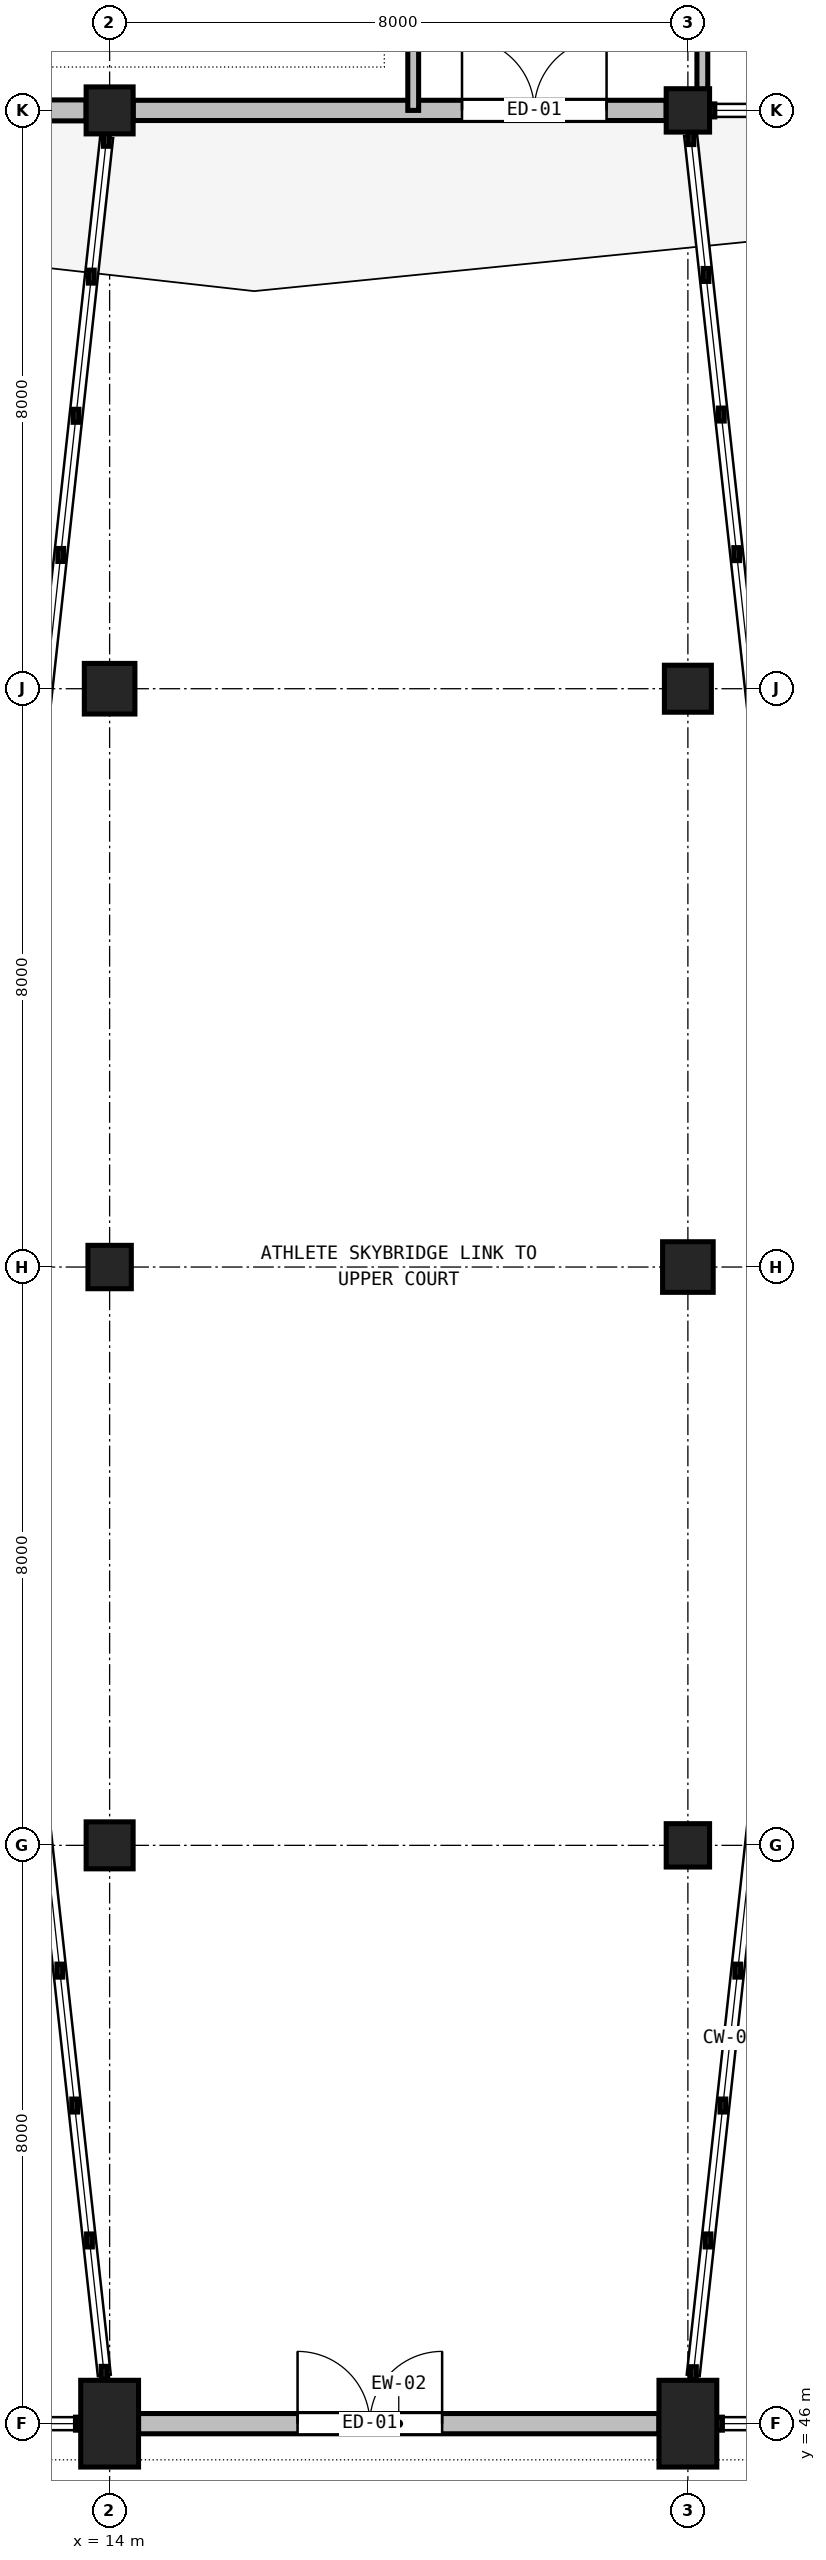
"""IFC4 building model, lengths in metres.
Left out: names, types, materials, properties, quantities, classifications, styles, units other than length and angle.
Written with IfcOpenShell. Run it as: python <this file> out.ifc"""

import sys

from ifc_helpers import new_model, si_unit, direction, frame, frame_2d, origin, origin_2d, place, context, subcontext, project, spatial, rectangle, extrude, element, fill, save


model = new_model("IFC4")
c1 = context("Model", 3, precision=1e-05, world=origin(), true_north=direction((0.0, 1.0)))
c2 = subcontext(c1, "Body", "Model", "MODEL_VIEW")
j1 = project(units=[si_unit("LENGTHUNIT", "METRE"), si_unit("PLANEANGLEUNIT", "RADIAN")], contexts=[c1])
p1 = place(None, origin())
s1 = spatial("IfcSite", under=j1, at=p1, CompositionType="ELEMENT")
p2 = place(p1, origin())
s2 = spatial("IfcBuilding", under=s1, at=p2, CompositionType="ELEMENT")
p3 = place(p2, frame((0.0, 0.0, 10.8)))
s3 = spatial("IfcBuildingStorey", under=s2, at=p3, CompositionType="ELEMENT", Elevation=10.8)
p4 = place(p3, frame((14.0, 46.0, 0.0), z_axis=(0.0, 0.0, 1.0), x_axis=(1.0, 0.0, 0.0)))
e1 = element("IfcColumn", 1, at=p4, inside=s3, PredefinedType="COLUMN", context=c2, shape_type="SweptSolid", body=[
    extrude(rectangle(XDim=0.8, YDim=1.2, at=origin_2d()), origin(), (0.0, 0.0, 1.0), 4.2),
])
p5 = place(p3, frame((14.0, 54.0, 0.0), z_axis=(0.0, 0.0, 1.0), x_axis=(1.0, 0.0, 0.0)))
e2 = element("IfcColumn", 2, at=p5, inside=s3, PredefinedType="COLUMN", context=c2, shape_type="SweptSolid", body=[
    extrude(rectangle(XDim=0.65, YDim=0.65, at=origin_2d()), origin(), (0.0, 0.0, 1.0), 4.2),
])
p6 = place(p3, frame((14.0, 62.0, 0.0), z_axis=(0.0, 0.0, 1.0), x_axis=(1.0, 0.0, 0.0)))
e3 = element("IfcColumn", 3, at=p6, inside=s3, PredefinedType="COLUMN", context=c2, shape_type="SweptSolid", body=[
    extrude(rectangle(XDim=0.6, YDim=0.6, at=origin_2d()), origin(), (0.0, 0.0, 1.0), 4.2),
])
p7 = place(p3, frame((14.0, 70.0, 0.0), z_axis=(0.0, 0.0, 1.0), x_axis=(1.0, 0.0, 0.0)))
e4 = element("IfcColumn", 4, at=p7, inside=s3, PredefinedType="COLUMN", context=c2, shape_type="SweptSolid", body=[
    extrude(rectangle(XDim=0.7, YDim=0.7, at=origin_2d()), origin(), (0.0, 0.0, 1.0), 4.2),
])
p8 = place(p3, frame((14.0, 78.0, 0.0), z_axis=(0.0, 0.0, 1.0), x_axis=(1.0, 0.0, 0.0)))
e5 = element("IfcColumn", 5, at=p8, inside=s3, PredefinedType="COLUMN", context=c2, shape_type="SweptSolid", body=[
    extrude(rectangle(XDim=0.65, YDim=0.65, at=origin_2d()), origin(), (0.0, 0.0, 1.0), 4.2),
])
p9 = place(p3, frame((22.0, 46.0, 0.0), z_axis=(0.0, 0.0, 1.0), x_axis=(1.0, 0.0, 0.0)))
e6 = element("IfcColumn", 6, at=p9, inside=s3, PredefinedType="COLUMN", context=c2, shape_type="SweptSolid", body=[
    extrude(rectangle(XDim=0.8, YDim=1.2, at=origin_2d()), origin(), (0.0, 0.0, 1.0), 4.2),
])
p10 = place(p3, frame((22.0, 54.0, 0.0), z_axis=(0.0, 0.0, 1.0), x_axis=(1.0, 0.0, 0.0)))
e7 = element("IfcColumn", 7, at=p10, inside=s3, PredefinedType="COLUMN", context=c2, shape_type="SweptSolid", body=[
    extrude(rectangle(XDim=0.6, YDim=0.6, at=origin_2d()), origin(), (0.0, 0.0, 1.0), 4.2),
])
p11 = place(p3, frame((22.0, 62.0, 0.0), z_axis=(0.0, 0.0, 1.0), x_axis=(1.0, 0.0, 0.0)))
e8 = element("IfcColumn", 8, at=p11, inside=s3, PredefinedType="COLUMN", context=c2, shape_type="SweptSolid", body=[
    extrude(rectangle(XDim=0.7, YDim=0.7, at=origin_2d()), origin(), (0.0, 0.0, 1.0), 4.2),
])
p12 = place(p3, frame((22.0, 70.0, 0.0), z_axis=(0.0, 0.0, 1.0), x_axis=(1.0, 0.0, 0.0)))
e9 = element("IfcColumn", 9, at=p12, inside=s3, PredefinedType="COLUMN", context=c2, shape_type="SweptSolid", body=[
    extrude(rectangle(XDim=0.65, YDim=0.65, at=origin_2d()), origin(), (0.0, 0.0, 1.0), 4.2),
])
p13 = place(p3, frame((22.0, 78.0, 0.0), z_axis=(0.0, 0.0, 1.0), x_axis=(1.0, 0.0, 0.0)))
e10 = element("IfcColumn", 10, at=p13, inside=s3, PredefinedType="COLUMN", context=c2, shape_type="SweptSolid", body=[
    extrude(rectangle(XDim=0.6, YDim=0.6, at=origin_2d()), origin(), (0.0, 0.0, 1.0), 4.2),
])
p14 = place(p3, frame((14.4, 46.0, 0.0), z_axis=(0.0, 0.0, 1.0), x_axis=(1.0, 0.0, 0.0)))
e11 = element("IfcWall", 11, at=p14, inside=s3, PredefinedType="SOLIDWALL", context=c2, shape_type="SweptSolid", body=[
    extrude(rectangle(XDim=7.2, YDim=0.28, at=frame_2d((3.6, 0.0))), origin(), (0.0, 0.0, 1.0), 3.16),
])
p15 = place(p14, frame((2.2, 0.0, 0.0)))
e12 = element("IfcOpeningElement", 12, at=p15, cuts=e11, PredefinedType="OPENING", context=c2, shape_type="SweptSolid", body=[
    extrude(rectangle(XDim=2.0, YDim=2.4, at=frame_2d((1.0, 1.2))), frame((0.0, 0.15, 0.0), z_axis=(0.0, -1.0, 0.0), x_axis=(1.0, 0.0, 0.0)), (0.0, 0.0, 1.0), 0.3),
])
p16 = place(p3, frame((6.325, 78.0, 0.0), z_axis=(0.0, 0.0, 1.0), x_axis=(1.0, 0.0, 0.0)))
e13 = element("IfcWall", 13, at=p16, inside=s3, PredefinedType="SOLIDWALL", context=c2, shape_type="SweptSolid", body=[
    extrude(rectangle(XDim=7.35, YDim=0.29, at=frame_2d((3.675, 0.0))), origin(), (0.0, 0.0, 1.0), 3.31),
])
p17 = place(p16, frame((0.85, 0.0, 0.55)))
e14 = element("IfcOpeningElement", 14, at=p17, cuts=e13, PredefinedType="OPENING", context=c2, shape_type="SweptSolid", body=[
    extrude(rectangle(XDim=1.6, YDim=2.0, at=frame_2d((0.8, 1.0))), frame((0.0, 0.155, 0.0), z_axis=(0.0, -1.0, 0.0), x_axis=(1.0, 0.0, 0.0)), (0.0, 0.0, 1.0), 0.31),
])
p18 = place(p16, frame((4.45, 0.0, 0.7)))
e15 = element("IfcOpeningElement", 15, at=p18, cuts=e13, PredefinedType="OPENING", context=c2, shape_type="SweptSolid", body=[
    extrude(rectangle(XDim=1.95, YDim=1.85, at=frame_2d((0.975, 0.925))), frame((0.0, 0.155, 0.0), z_axis=(0.0, -1.0, 0.0), x_axis=(1.0, 0.0, 0.0)), (0.0, 0.0, 1.0), 0.31),
])
p19 = place(p3, frame((14.325, 78.0, 0.0), z_axis=(0.0, 0.0, 1.0), x_axis=(1.0, 0.0, 0.0)))
e16 = element("IfcWall", 16, at=p19, inside=s3, PredefinedType="SOLIDWALL", context=c2, shape_type="SweptSolid", body=[
    extrude(rectangle(XDim=7.375, YDim=0.28, at=frame_2d((3.688, 0.0))), origin(), (0.0, 0.0, 1.0), 3.11),
])
p20 = place(p19, frame((4.55, 0.0, 0.0)))
e17 = element("IfcOpeningElement", 17, at=p20, cuts=e16, PredefinedType="OPENING", context=c2, shape_type="SweptSolid", body=[
    extrude(rectangle(XDim=2.0, YDim=2.4, at=frame_2d((1.0, 1.2))), frame((0.0, 0.15, 0.0), z_axis=(0.0, -1.0, 0.0), x_axis=(1.0, 0.0, 0.0)), (0.0, 0.0, 1.0), 0.3),
])
p21 = place(p3, frame((18.2, 78.0, 0.0), z_axis=(0.0, 0.0, 1.0), x_axis=(0.0, 1.0, 0.0)))
e18 = element("IfcWall", 18, at=p21, inside=s3, PredefinedType="PARTITIONING", context=c2, shape_type="SweptSolid", body=[
    extrude(rectangle(XDim=12.0, YDim=0.15, at=frame_2d((6.0, 0.0))), origin(), (0.0, 0.0, 1.0), 3.9),
])
p22 = place(p3, frame((22.2, 78.0, 0.0), z_axis=(0.0, 0.0, 1.0), x_axis=(0.0, 1.0, 0.0)))
e19 = element("IfcWall", 19, at=p22, inside=s3, PredefinedType="PARTITIONING", context=c2, shape_type="SweptSolid", body=[
    extrude(rectangle(XDim=12.0, YDim=0.15, at=frame_2d((6.0, 0.0))), origin(), (0.0, 0.0, 1.0), 3.06),
])
p23 = place(p15, origin())
e20 = element("IfcDoor", 20, at=p23, inside=s3, OperationType="DOUBLE_DOOR_SINGLE_SWING", PredefinedType="DOOR", context=c2, shape_type="SweptSolid", body=[
    extrude(rectangle(XDim=2.0, YDim=2.4, at=frame_2d((1.0, 1.2))), frame((0.0, 0.025, 0.0), z_axis=(0.0, -1.0, 0.0), x_axis=(1.0, 0.0, 0.0)), (0.0, 0.0, 1.0), 0.05),
])
fill(e12, e20)
p24 = place(p20, origin())
e21 = element("IfcDoor", 21, at=p24, inside=s3, OperationType="DOUBLE_DOOR_SINGLE_SWING", PredefinedType="DOOR", context=c2, shape_type="SweptSolid", body=[
    extrude(rectangle(XDim=2.0, YDim=2.4, at=frame_2d((1.0, 1.2))), frame((0.0, 0.025, 0.0), z_axis=(0.0, -1.0, 0.0), x_axis=(1.0, 0.0, 0.0)), (0.0, 0.0, 1.0), 0.05),
])
fill(e17, e21)
save(model, sys.argv[1])
